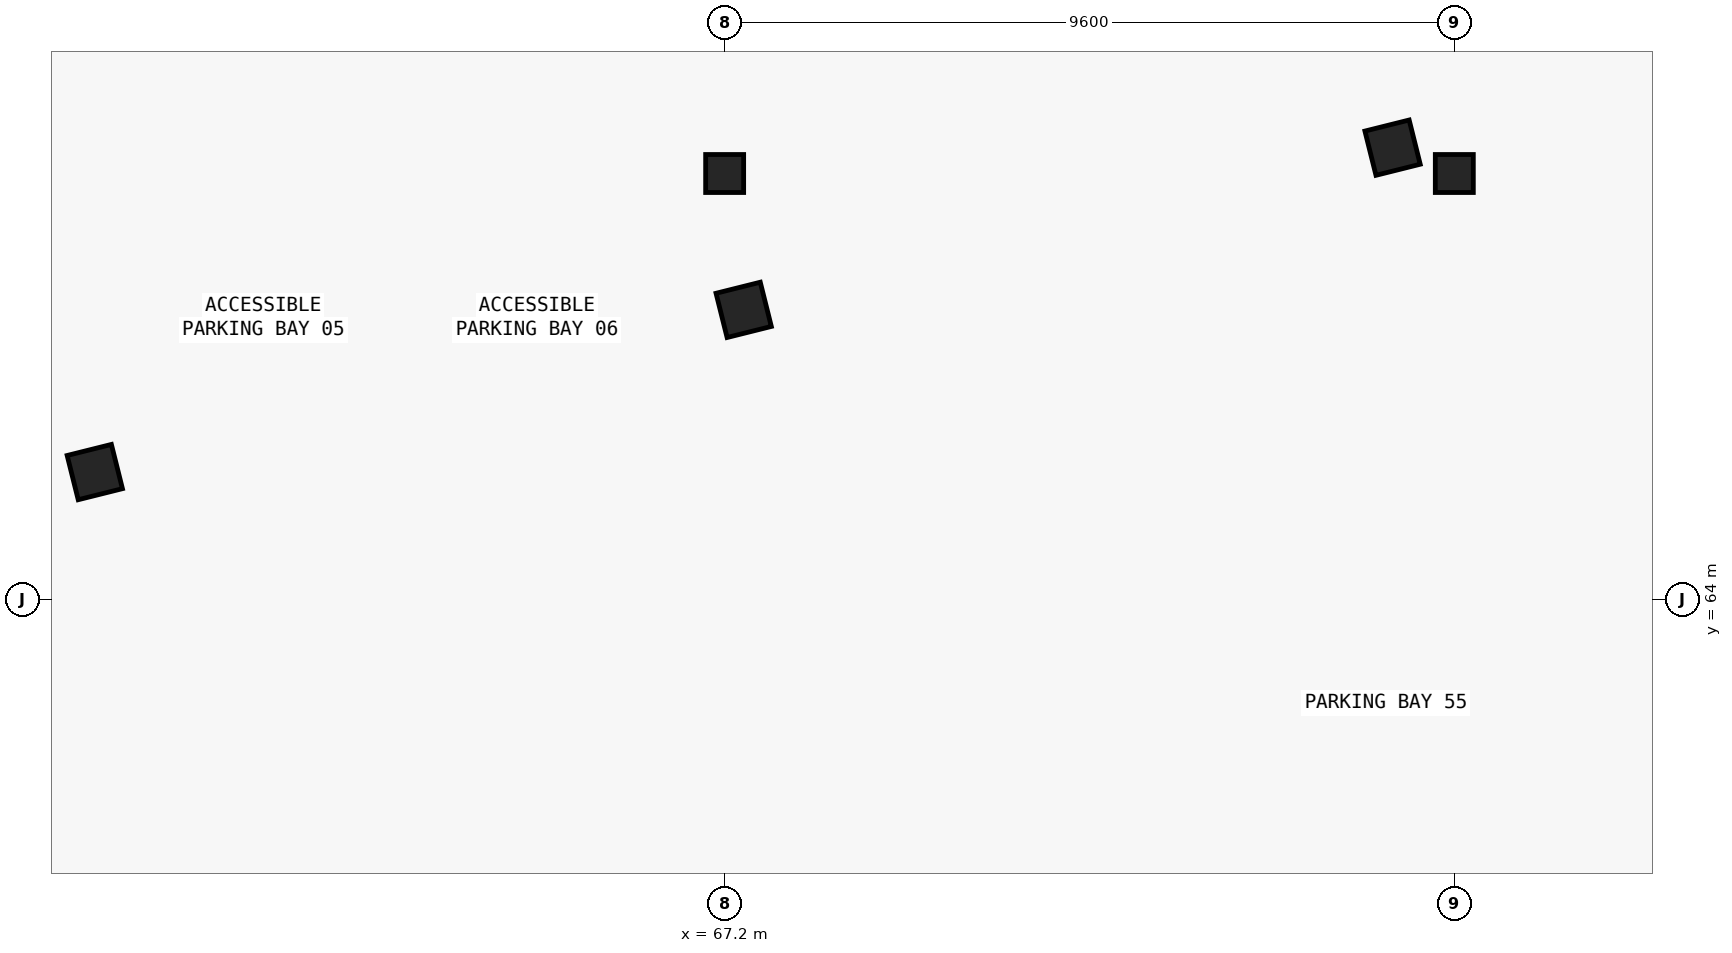
"""IFC4 building model, lengths in metres.
Left out: names, types, materials, properties, quantities, classifications, styles, units other than length and angle.
Written with IfcOpenShell. Run it as: python <this file> out.ifc"""

import sys

from ifc_helpers import new_model, si_unit, direction, frame, origin, origin_2d, place, context, subcontext, project, spatial, rectangle, extrude, element, save


model = new_model("IFC4")
c1 = context("Model", 3, precision=1e-05, world=origin(), true_north=direction((0.0, 1.0)))
c2 = subcontext(c1, "Body", "Model", "MODEL_VIEW")
j1 = project(units=[si_unit("LENGTHUNIT", "METRE"), si_unit("PLANEANGLEUNIT", "RADIAN")], contexts=[c1])
p1 = place(None, origin())
s1 = spatial("IfcSite", under=j1, at=p1, CompositionType="ELEMENT")
p2 = place(p1, origin())
s2 = spatial("IfcBuilding", under=s1, at=p2, CompositionType="ELEMENT")
p3 = place(p2, frame((0.0, 0.0, -4.55)))
s3 = spatial("IfcBuildingStorey", under=s2, at=p3, CompositionType="ELEMENT", Elevation=-4.55)
for number, where, z_axis, x_axis in (
    (1, (67.2, 69.6, 0.0), (0.0, 0.0, 1.0), (1.0, 0.0, 0.0)),
    (2, (76.8, 69.6, 0.0), (0.0, 0.0, 1.0), (1.0, 0.0, 0.0)),
):
    element("IfcColumn", number, at=place(p3, frame(where, z_axis=z_axis, x_axis=x_axis)), inside=s3, PredefinedType="COLUMN", context=c2, shape_type="SweptSolid", body=[
        extrude(rectangle(XDim=0.5, YDim=0.5, at=origin_2d()), origin(), (0.0, 0.0, 1.0), 4.55),
    ])
for number, where, z_axis, x_axis in (
    (3, (58.913, 65.671, 0.0), (0.0, 0.0, 1.0), (0.97, 0.243, 0.0)),
    (4, (67.45, 67.806, 0.0), (0.0, 0.0, 1.0), (0.97, 0.243, 0.0)),
    (5, (75.988, 69.94, 0.0), (0.0, 0.0, 1.0), (0.97, 0.243, 0.0)),
):
    element("IfcColumn", number, at=place(p3, frame(where, z_axis=z_axis, x_axis=x_axis)), inside=s3, PredefinedType="COLUMN", context=c2, shape_type="SweptSolid", body=[
        extrude(rectangle(XDim=0.6, YDim=0.6, at=origin_2d()), origin(), (0.0, 0.0, 1.0), 4.55),
    ])
save(model, sys.argv[1])
